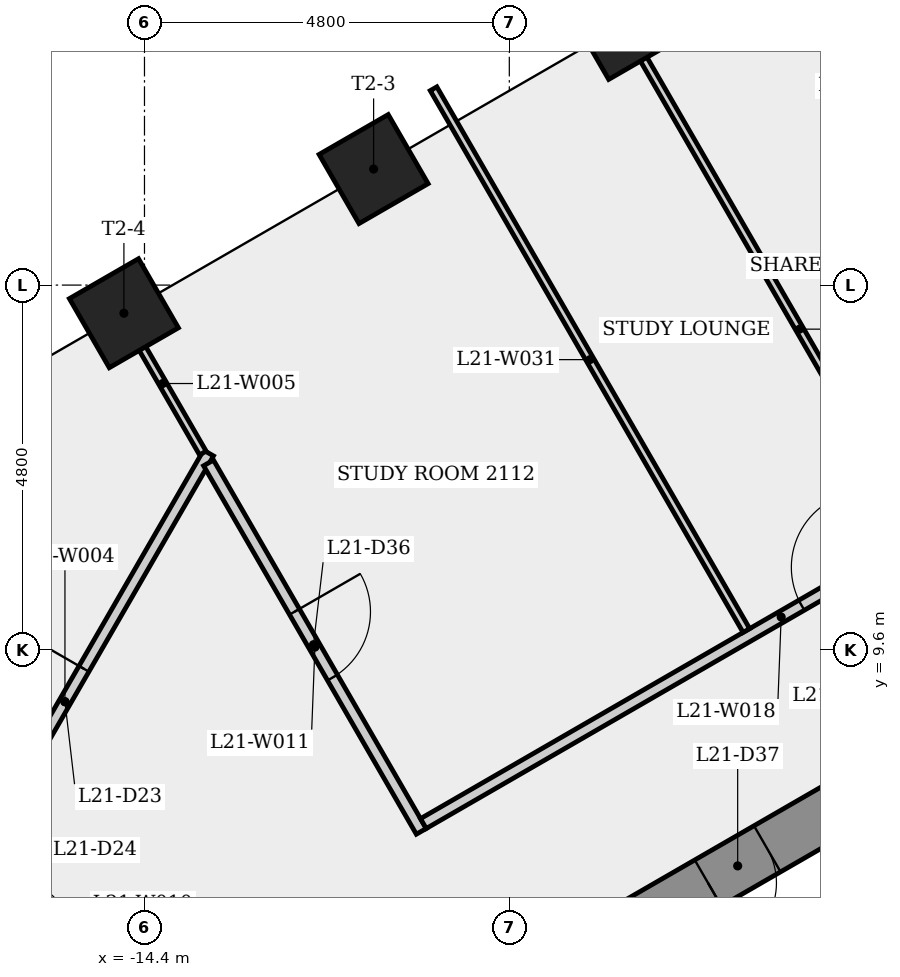
"""IFC4 building model, lengths in metres.
Left out: names, types, materials, properties, quantities, classifications, styles, units other than length and angle.
Written with IfcOpenShell. Run it as: python <this file> out.ifc"""

import sys

from ifc_helpers import new_model, si_unit, direction, frame, frame_2d, origin, origin_2d, place, context, subcontext, project, spatial, rectangle, extrude, element, fill, save


model = new_model("IFC4")
c1 = context("Model", 3, precision=1e-05, world=origin(), true_north=direction((0.0, 1.0)))
c2 = subcontext(c1, "Body", "Model", "MODEL_VIEW")
j1 = project(units=[si_unit("LENGTHUNIT", "METRE"), si_unit("PLANEANGLEUNIT", "RADIAN")], contexts=[c1])
p1 = place(None, origin())
s1 = spatial("IfcSite", under=j1, at=p1, CompositionType="ELEMENT")
p2 = place(p1, origin())
s2 = spatial("IfcBuilding", under=s1, at=p2, CompositionType="ELEMENT")
p3 = place(p2, frame((0.0, 0.0, 83.1)))
s3 = spatial("IfcBuildingStorey", under=s2, at=p3, CompositionType="ELEMENT", Elevation=83.1)
p4 = place(p3, frame((0.175, 10.667, 0.0), z_axis=(0.0, 0.0, 1.0), x_axis=(-0.866023993627, -0.500002442456, 0.0)))
e1 = element("IfcWall", 1, at=p4, inside=s3, PredefinedType="SHEAR", context=c2, shape_type="SweptSolid", body=[
    extrude(rectangle(XDim=10.97, YDim=0.7, at=frame_2d((5.485, 0.0))), origin(), (0.0, 0.0, 1.0), 3.4),
])
p5 = place(p4, frame((7.368, 0.0, 0.0)))
e2 = element("IfcOpeningElement", 2, at=p5, cuts=e1, PredefinedType="OPENING", context=c2, shape_type="SweptSolid", body=[
    extrude(rectangle(XDim=0.9, YDim=2.1, at=frame_2d((0.45, 1.05))), frame((0.0, 0.36, 0.0), z_axis=(0.0, -1.0, 0.0), x_axis=(1.0, 0.0, 0.0)), (0.0, 0.0, 1.0), 0.72),
])
for number, where, z_axis, x_axis in (
    (3, (-8.1, 17.823, 0.0), (0.0, 0.0, 1.0), (-0.5, 0.866, 0.0)),
    (4, (-11.385, 15.927, 0.0), (0.0, 0.0, 1.0), (-0.5, 0.866, 0.0)),
    (5, (-14.671, 14.03, 0.0), (0.0, 0.0, 1.0), (-0.5, 0.866, 0.0)),
):
    element("IfcColumn", number, at=place(p3, frame(where, z_axis=z_axis, x_axis=x_axis)), inside=s3, PredefinedType="COLUMN", context=c2, shape_type="SweptSolid", body=[
        extrude(rectangle(XDim=1.05, YDim=1.05, at=origin_2d()), origin(), (0.0, 0.0, 1.0), 3.4),
    ])
p6 = place(p3, frame((-17.335, 5.646, 0.0), z_axis=(0.0, 0.0, 1.0), x_axis=(0.499989064333, 0.866031717402, 0.0)))
e6 = element("IfcWall", 6, at=p6, inside=s3, PredefinedType="PARTITIONING", context=c2, shape_type="SweptSolid", body=[
    extrude(rectangle(XDim=7.557, YDim=0.15, at=frame_2d((3.778, 0.0))), origin(), (0.0, 0.0, 1.0), 3.05),
])
p7 = place(p6, frame((3.278, 0.0, 0.0)))
e7 = element("IfcOpeningElement", 7, at=p7, cuts=e6, PredefinedType="OPENING", context=c2, shape_type="SweptSolid", body=[
    extrude(rectangle(XDim=1.0, YDim=2.1, at=frame_2d((0.5, 1.05))), frame((0.0, 0.085, 0.0), z_axis=(0.0, -1.0, 0.0), x_axis=(1.0, 0.0, 0.0)), (0.0, 0.0, 1.0), 0.17),
])
p8 = place(p3, frame((-14.688, 14.02, 0.0), z_axis=(0.0, 0.0, 1.0), x_axis=(0.500079259916, -0.865979638214, 0.0)))
e8 = element("IfcWall", 8, at=p8, inside=s3, PredefinedType="PARTITIONING", context=c2, shape_type="SweptSolid", body=[
    extrude(rectangle(XDim=2.113, YDim=0.1, at=frame_2d((1.056, 0.0))), origin(), (0.0, 0.0, 1.0), 3.05),
])
p9 = place(p3, frame((-13.557, 12.06, 0.0), z_axis=(0.0, 0.0, 1.0), x_axis=(0.499966582715, -0.866044696403, 0.0)))
e9 = element("IfcWall", 9, at=p9, inside=s3, PredefinedType="PARTITIONING", context=c2, shape_type="SweptSolid", body=[
    extrude(rectangle(XDim=5.598, YDim=0.15, at=frame_2d((2.799, 0.0))), origin(), (0.0, 0.0, 1.0), 3.05),
])
p10 = place(p9, frame((2.261, 0.0, 0.0)))
e10 = element("IfcOpeningElement", 10, at=p10, cuts=e9, PredefinedType="OPENING", context=c2, shape_type="SweptSolid", body=[
    extrude(rectangle(XDim=1.0, YDim=2.1, at=frame_2d((0.5, 1.05))), frame((0.0, 0.085, 0.0), z_axis=(0.0, -1.0, 0.0), x_axis=(1.0, 0.0, 0.0)), (0.0, 0.0, 1.0), 0.17),
])
p11 = place(p3, frame((-10.731, 7.315, 0.0), z_axis=(0.0, 0.0, 1.0), x_axis=(0.866024779313, 0.500001081615, 0.0)))
e11 = element("IfcWall", 11, at=p11, inside=s3, PredefinedType="PARTITIONING", context=c2, shape_type="SweptSolid", body=[
    extrude(rectangle(XDim=10.872, YDim=0.15, at=frame_2d((5.436, 0.0))), origin(), (0.0, 0.0, 1.0), 3.05),
])
p12 = place(p11, frame((5.745, 0.0, 0.0)))
e12 = element("IfcOpeningElement", 12, at=p12, cuts=e11, PredefinedType="OPENING", context=c2, shape_type="SweptSolid", body=[
    extrude(rectangle(XDim=1.0, YDim=2.1, at=frame_2d((0.5, 1.05))), frame((0.0, 0.085, 0.0), z_axis=(0.0, -1.0, 0.0), x_axis=(1.0, 0.0, 0.0)), (0.0, 0.0, 1.0), 0.17),
])
p13 = place(p3, frame((-6.481, 9.855, 0.0), z_axis=(0.0, 0.0, 1.0), x_axis=(-0.499986033803, 0.866033467022, 0.0)))
e13 = element("IfcWall", 13, at=p13, inside=s3, PredefinedType="PARTITIONING", context=c2, shape_type="SweptSolid", body=[
    extrude(rectangle(XDim=8.232, YDim=0.1, at=frame_2d((4.116, 0.0))), origin(), (0.0, 0.0, 1.0), 3.05),
])
p14 = place(p3, frame((-4.239, 11.149, 0.0), z_axis=(0.0, 0.0, 1.0), x_axis=(-0.499983743644, 0.866034789193, 0.0)))
e14 = element("IfcWall", 14, at=p14, inside=s3, PredefinedType="PARTITIONING", context=c2, shape_type="SweptSolid", body=[
    extrude(rectangle(XDim=7.711, YDim=0.1, at=frame_2d((3.855, 0.0))), origin(), (0.0, 0.0, 1.0), 3.05),
])
p15 = place(p7, origin())
e15 = element("IfcDoor", 15, at=p15, inside=s3, OperationType="SINGLE_SWING_RIGHT", PredefinedType="DOOR", context=c2, shape_type="SweptSolid", body=[
    extrude(rectangle(XDim=1.0, YDim=2.1, at=frame_2d((0.5, 1.05))), frame((0.0, 0.025, 0.0), z_axis=(0.0, -1.0, 0.0), x_axis=(1.0, 0.0, 0.0)), (0.0, 0.0, 1.0), 0.05),
])
fill(e7, e15)
p16 = place(p12, origin())
e16 = element("IfcDoor", 16, at=p16, inside=s3, OperationType="SINGLE_SWING_RIGHT", PredefinedType="DOOR", context=c2, shape_type="SweptSolid", body=[
    extrude(rectangle(XDim=1.0, YDim=2.1, at=frame_2d((0.5, 1.05))), frame((0.0, 0.025, 0.0), z_axis=(0.0, -1.0, 0.0), x_axis=(1.0, 0.0, 0.0)), (0.0, 0.0, 1.0), 0.05),
])
fill(e12, e16)
p17 = place(p10, origin())
e17 = element("IfcDoor", 17, at=p17, inside=s3, OperationType="SINGLE_SWING_LEFT", PredefinedType="DOOR", context=c2, shape_type="SweptSolid", body=[
    extrude(rectangle(XDim=1.0, YDim=2.1, at=frame_2d((0.5, 1.05))), frame((0.0, 0.025, 0.0), z_axis=(0.0, -1.0, 0.0), x_axis=(1.0, 0.0, 0.0)), (0.0, 0.0, 1.0), 0.05),
])
fill(e10, e17)
p18 = place(p5, origin())
e18 = element("IfcDoor", 18, at=p18, inside=s3, OperationType="SINGLE_SWING_RIGHT", PredefinedType="DOOR", context=c2, shape_type="SweptSolid", body=[
    extrude(rectangle(XDim=0.9, YDim=2.1, at=frame_2d((0.45, 1.05))), frame((0.0, 0.025, 0.0), z_axis=(0.0, -1.0, 0.0), x_axis=(1.0, 0.0, 0.0)), (0.0, 0.0, 1.0), 0.05),
])
fill(e2, e18)
save(model, sys.argv[1])
